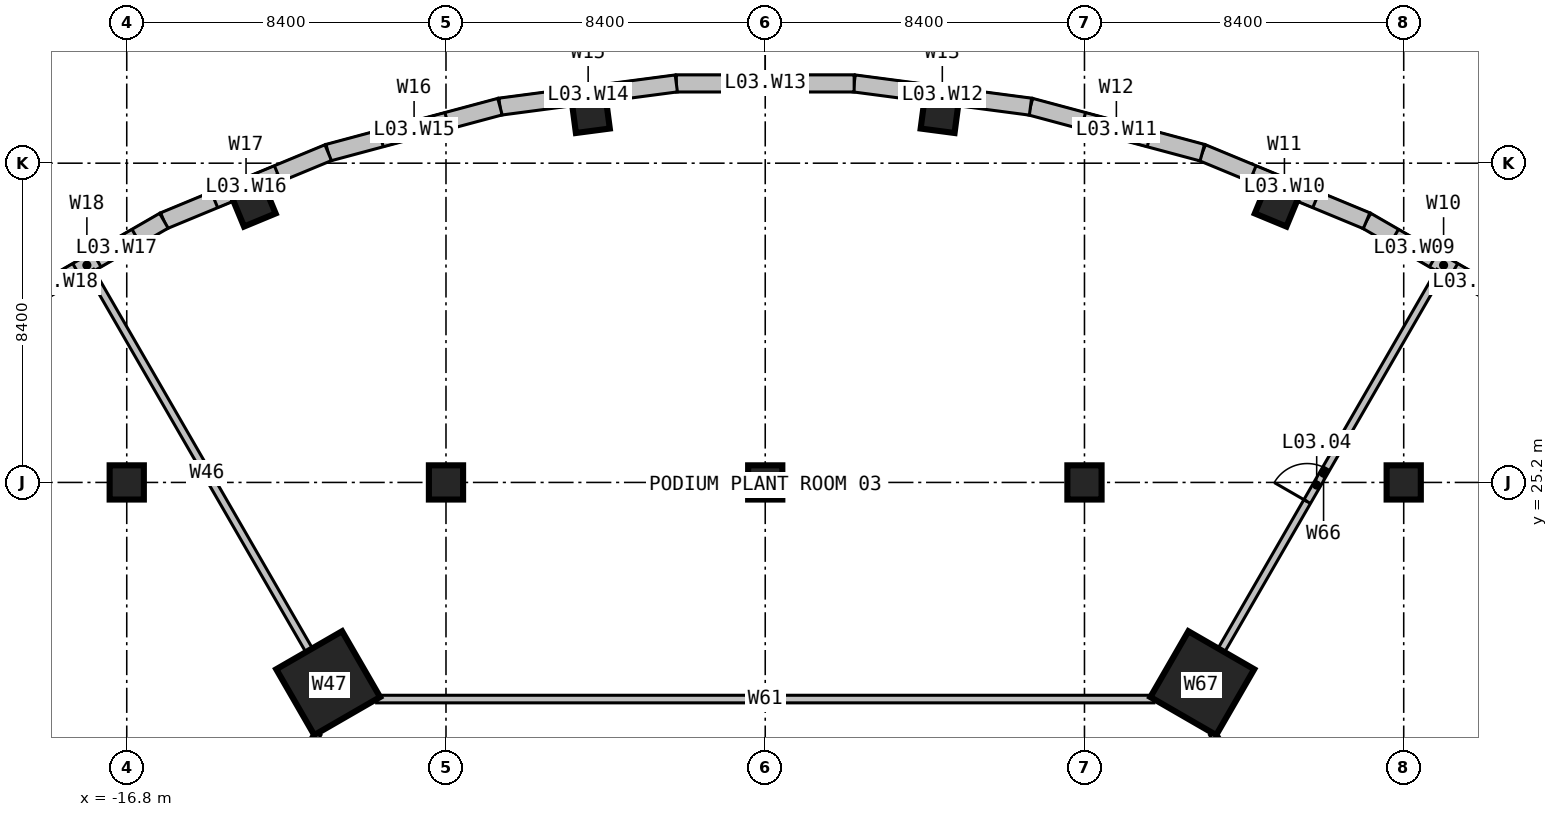
"""IFC4 building model, lengths in metres.
Left out: names, types, materials, properties, quantities, classifications, styles, units other than length and angle.
Written with IfcOpenShell. Run it as: python <this file> out.ifc"""

import sys

from ifc_helpers import new_model, si_unit, direction, frame, frame_2d, origin, origin_2d, place, context, subcontext, project, spatial, rectangle, hollow_rectangle, extrude, element, fill, save


model = new_model("IFC4")
c1 = context("Model", 3, precision=1e-05, world=origin(), true_north=direction((0.0, 1.0)))
c2 = subcontext(c1, "Body", "Model", "MODEL_VIEW")
j1 = project(units=[si_unit("LENGTHUNIT", "METRE"), si_unit("PLANEANGLEUNIT", "RADIAN")], contexts=[c1])
p1 = place(None, origin())
s1 = spatial("IfcSite", under=j1, at=p1, CompositionType="ELEMENT")
p2 = place(p1, origin())
s2 = spatial("IfcBuilding", under=s1, at=p2, CompositionType="ELEMENT")
p3 = place(p2, frame((0.0, 0.0, 16.0)))
s3 = spatial("IfcBuildingStorey", under=s2, at=p3, CompositionType="ELEMENT", Elevation=16.0)
for number, where, z_axis, x_axis in (
    (1, (-16.8, 25.2, 0.0), (0.0, 0.0, 1.0), (1.0, 0.0, 0.0)),
    (2, (-8.4, 25.2, 0.0), (0.0, 0.0, 1.0), (1.0, 0.0, 0.0)),
    (3, (0.0, 25.2, 0.0), (0.0, 0.0, 1.0), (1.0, 0.0, 0.0)),
    (4, (8.4, 25.2, 0.0), (0.0, 0.0, 1.0), (1.0, 0.0, 0.0)),
    (5, (16.8, 25.2, 0.0), (0.0, 0.0, 1.0), (1.0, 0.0, 0.0)),
    (6, (13.47, 32.521, 0.0), (0.0, 0.0, 1.0), (0.383, 0.924, 0.0)),
    (7, (4.594, 34.899, 0.0), (0.0, 0.0, 1.0), (0.131, 0.991, 0.0)),
    (8, (-4.594, 34.899, 0.0), (0.0, 0.0, 1.0), (-0.131, 0.991, 0.0)),
    (9, (-13.47, 32.521, 0.0), (0.0, 0.0, 1.0), (-0.383, 0.924, 0.0)),
):
    element("IfcColumn", number, at=place(p3, frame(where, z_axis=z_axis, x_axis=x_axis)), inside=s3, PredefinedType="COLUMN", context=c2, shape_type="SweptSolid", body=[
        extrude(rectangle(XDim=0.9, YDim=0.9, at=origin_2d()), origin(), (0.0, 0.0, 1.0), 5.0),
    ])
for number, where, z_axis, x_axis in (
    (10, (11.5, 19.919, 0.0), (0.0, 0.0, 1.0), (0.5, 0.866, 0.0)),
    (11, (-11.5, 19.919, 0.0), (0.0, 0.0, 1.0), (-0.5, 0.866, 0.0)),
):
    element("IfcColumn", number, at=place(p3, frame(where, z_axis=z_axis, x_axis=x_axis)), inside=s3, PredefinedType="COLUMN", context=c2, shape_type="SweptSolid", body=[
        extrude(hollow_rectangle(XDim=2.0, YDim=2.0, WallThickness=0.24, at=origin_2d()), origin(), (0.0, 0.0, 1.0), 4.29),
    ])
p4 = place(p3, frame((19.875, 29.746, 0.0), z_axis=(0.0, 0.0, 1.0), x_axis=(-0.866012687223, 0.500022025083, 0.0)))
e12 = element("IfcWall", 12, at=p4, inside=s3, PredefinedType="SOLIDWALL", context=c2, shape_type="SweptSolid", body=[
    extrude(rectangle(XDim=4.679, YDim=0.45, at=frame_2d((2.34, 0.0))), origin(), (0.0, 0.0, 1.0), 4.7),
])
p5 = place(p4, frame((0.84, 0.0, 0.9)))
e13 = element("IfcOpeningElement", 13, at=p5, cuts=e12, PredefinedType="OPENING", context=c2, shape_type="SweptSolid", body=[
    extrude(rectangle(XDim=1.2, YDim=2.4, at=frame_2d((0.6, 1.2))), frame((0.0, 0.235, 0.0), z_axis=(0.0, -1.0, 0.0), x_axis=(1.0, 0.0, 0.0)), (0.0, 0.0, 1.0), 0.47),
])
p6 = place(p4, frame((2.64, 0.0, 0.9)))
e14 = element("IfcOpeningElement", 14, at=p6, cuts=e12, PredefinedType="OPENING", context=c2, shape_type="SweptSolid", body=[
    extrude(rectangle(XDim=1.2, YDim=2.4, at=frame_2d((0.6, 1.2))), frame((0.0, 0.235, 0.0), z_axis=(0.0, -1.0, 0.0), x_axis=(1.0, 0.0, 0.0)), (0.0, 0.0, 1.0), 0.47),
])
p7 = place(p3, frame((15.823, 32.086, 0.0), z_axis=(0.0, 0.0, 1.0), x_axis=(-0.923885213032, 0.382669718086, 0.0)))
e15 = element("IfcWall", 15, at=p7, inside=s3, PredefinedType="SOLIDWALL", context=c2, shape_type="SweptSolid", body=[
    extrude(rectangle(XDim=4.68, YDim=0.45, at=frame_2d((2.34, 0.0))), origin(), (0.0, 0.0, 1.0), 4.7),
])
p8 = place(p7, frame((1.44, 0.0, 0.9)))
e16 = element("IfcOpeningElement", 16, at=p8, cuts=e15, PredefinedType="OPENING", context=c2, shape_type="SweptSolid", body=[
    extrude(rectangle(XDim=1.8, YDim=2.4, at=frame_2d((0.9, 1.2))), frame((0.0, 0.235, 0.0), z_axis=(0.0, -1.0, 0.0), x_axis=(1.0, 0.0, 0.0)), (0.0, 0.0, 1.0), 0.47),
])
p9 = place(p3, frame((11.5, 33.876, 0.0), z_axis=(0.0, 0.0, 1.0), x_axis=(-0.965926860523, 0.258815185258, 0.0)))
e17 = element("IfcWall", 17, at=p9, inside=s3, PredefinedType="SOLIDWALL", context=c2, shape_type="SweptSolid", body=[
    extrude(rectangle(XDim=4.68, YDim=0.45, at=frame_2d((2.34, 0.0))), origin(), (0.0, 0.0, 1.0), 4.7),
])
p10 = place(p9, frame((1.44, 0.0, 0.9)))
e18 = element("IfcOpeningElement", 18, at=p10, cuts=e17, PredefinedType="OPENING", context=c2, shape_type="SweptSolid", body=[
    extrude(rectangle(XDim=1.8, YDim=2.4, at=frame_2d((0.9, 1.2))), frame((0.0, 0.235, 0.0), z_axis=(0.0, -1.0, 0.0), x_axis=(1.0, 0.0, 0.0)), (0.0, 0.0, 1.0), 0.47),
])
p11 = place(p3, frame((6.979, 35.088, 0.0), z_axis=(0.0, 0.0, 1.0), x_axis=(-0.991443459746, 0.130536838198, 0.0)))
e19 = element("IfcWall", 19, at=p11, inside=s3, PredefinedType="SOLIDWALL", context=c2, shape_type="SweptSolid", body=[
    extrude(rectangle(XDim=4.679, YDim=0.45, at=frame_2d((2.34, 0.0))), origin(), (0.0, 0.0, 1.0), 4.7),
])
p12 = place(p11, frame((1.44, 0.0, 0.9)))
e20 = element("IfcOpeningElement", 20, at=p12, cuts=e19, PredefinedType="OPENING", context=c2, shape_type="SweptSolid", body=[
    extrude(rectangle(XDim=1.8, YDim=2.4, at=frame_2d((0.9, 1.2))), frame((0.0, 0.235, 0.0), z_axis=(0.0, -1.0, 0.0), x_axis=(1.0, 0.0, 0.0)), (0.0, 0.0, 1.0), 0.47),
])
p13 = place(p3, frame((2.34, 35.698, 0.0), z_axis=(0.0, 0.0, 1.0), x_axis=(-1.0, 0.0, 0.0)))
e21 = element("IfcWall", 21, at=p13, inside=s3, PredefinedType="SOLIDWALL", context=c2, shape_type="SweptSolid", body=[
    extrude(rectangle(XDim=4.68, YDim=0.45, at=frame_2d((2.34, 0.0))), origin(), (0.0, 0.0, 1.0), 4.7),
])
p14 = place(p13, frame((1.44, 0.0, 0.9)))
e22 = element("IfcOpeningElement", 22, at=p14, cuts=e21, PredefinedType="OPENING", context=c2, shape_type="SweptSolid", body=[
    extrude(rectangle(XDim=1.8, YDim=2.4, at=frame_2d((0.9, 1.2))), frame((0.0, 0.235, 0.0), z_axis=(0.0, -1.0, 0.0), x_axis=(1.0, 0.0, 0.0)), (0.0, 0.0, 1.0), 0.47),
])
p15 = place(p3, frame((-2.34, 35.698, 0.0), z_axis=(0.0, 0.0, 1.0), x_axis=(-0.991443459746, -0.130536838198, 0.0)))
e23 = element("IfcWall", 23, at=p15, inside=s3, PredefinedType="SOLIDWALL", context=c2, shape_type="SweptSolid", body=[
    extrude(rectangle(XDim=4.679, YDim=0.45, at=frame_2d((2.34, 0.0))), origin(), (0.0, 0.0, 1.0), 4.7),
])
p16 = place(p15, frame((1.44, 0.0, 0.9)))
e24 = element("IfcOpeningElement", 24, at=p16, cuts=e23, PredefinedType="OPENING", context=c2, shape_type="SweptSolid", body=[
    extrude(rectangle(XDim=1.8, YDim=2.4, at=frame_2d((0.9, 1.2))), frame((0.0, 0.235, 0.0), z_axis=(0.0, -1.0, 0.0), x_axis=(1.0, 0.0, 0.0)), (0.0, 0.0, 1.0), 0.47),
])
p17 = place(p3, frame((-6.979, 35.088, 0.0), z_axis=(0.0, 0.0, 1.0), x_axis=(-0.965926860523, -0.258815185258, 0.0)))
e25 = element("IfcWall", 25, at=p17, inside=s3, PredefinedType="SOLIDWALL", context=c2, shape_type="SweptSolid", body=[
    extrude(rectangle(XDim=4.68, YDim=0.45, at=frame_2d((2.34, 0.0))), origin(), (0.0, 0.0, 1.0), 4.7),
])
p18 = place(p17, frame((1.44, 0.0, 0.9)))
e26 = element("IfcOpeningElement", 26, at=p18, cuts=e25, PredefinedType="OPENING", context=c2, shape_type="SweptSolid", body=[
    extrude(rectangle(XDim=1.8, YDim=2.4, at=frame_2d((0.9, 1.2))), frame((0.0, 0.235, 0.0), z_axis=(0.0, -1.0, 0.0), x_axis=(1.0, 0.0, 0.0)), (0.0, 0.0, 1.0), 0.47),
])
p19 = place(p3, frame((-11.5, 33.876, 0.0), z_axis=(0.0, 0.0, 1.0), x_axis=(-0.923885213032, -0.382669718086, 0.0)))
e27 = element("IfcWall", 27, at=p19, inside=s3, PredefinedType="SOLIDWALL", context=c2, shape_type="SweptSolid", body=[
    extrude(rectangle(XDim=4.68, YDim=0.45, at=frame_2d((2.34, 0.0))), origin(), (0.0, 0.0, 1.0), 4.7),
])
p20 = place(p19, frame((1.44, 0.0, 0.9)))
e28 = element("IfcOpeningElement", 28, at=p20, cuts=e27, PredefinedType="OPENING", context=c2, shape_type="SweptSolid", body=[
    extrude(rectangle(XDim=1.8, YDim=2.4, at=frame_2d((0.9, 1.2))), frame((0.0, 0.235, 0.0), z_axis=(0.0, -1.0, 0.0), x_axis=(1.0, 0.0, 0.0)), (0.0, 0.0, 1.0), 0.47),
])
p21 = place(p3, frame((-15.823, 32.086, 0.0), z_axis=(0.0, 0.0, 1.0), x_axis=(-0.866012687223, -0.500022025083, 0.0)))
e29 = element("IfcWall", 29, at=p21, inside=s3, PredefinedType="SOLIDWALL", context=c2, shape_type="SweptSolid", body=[
    extrude(rectangle(XDim=4.679, YDim=0.45, at=frame_2d((2.34, 0.0))), origin(), (0.0, 0.0, 1.0), 4.7),
])
p22 = place(p21, frame((0.84, 0.0, 0.9)))
e30 = element("IfcOpeningElement", 30, at=p22, cuts=e29, PredefinedType="OPENING", context=c2, shape_type="SweptSolid", body=[
    extrude(rectangle(XDim=1.2, YDim=2.4, at=frame_2d((0.6, 1.2))), frame((0.0, 0.235, 0.0), z_axis=(0.0, -1.0, 0.0), x_axis=(1.0, 0.0, 0.0)), (0.0, 0.0, 1.0), 0.47),
])
p23 = place(p21, frame((2.64, 0.0, 0.9)))
e31 = element("IfcOpeningElement", 31, at=p23, cuts=e29, PredefinedType="OPENING", context=c2, shape_type="SweptSolid", body=[
    extrude(rectangle(XDim=1.2, YDim=2.4, at=frame_2d((0.6, 1.2))), frame((0.0, 0.235, 0.0), z_axis=(0.0, -1.0, 0.0), x_axis=(1.0, 0.0, 0.0)), (0.0, 0.0, 1.0), 0.47),
])
p24 = place(p3, frame((-17.76, 30.76, 0.0), z_axis=(0.0, 0.0, 1.0), x_axis=(0.499954853145, -0.866051467764, 0.0)))
e32 = element("IfcWall", 32, at=p24, inside=s3, PredefinedType="PARTITIONING", context=c2, shape_type="SweptSolid", body=[
    extrude(rectangle(XDim=12.277, YDim=0.2, at=frame_2d((6.138, 0.0))), origin(), (0.0, 0.0, 1.0), 4.7),
])
p25 = place(p3, frame((-11.62, 20.124, 0.0), z_axis=(0.0, 0.0, 1.0), x_axis=(0.500070134591, -0.865984907773, 0.0)))
e33 = element("IfcWall", 33, at=p25, inside=s3, PredefinedType="PARTITIONING", context=c2, shape_type="SweptSolid", body=[
    extrude(rectangle(XDim=0.608, YDim=0.2, at=frame_2d((0.304, 0.0))), origin(), (0.0, 0.0, 1.0), 1.89),
])
p26 = place(p3, frame((-14.28, 14.28, 0.0), z_axis=(0.0, 0.0, 1.0), x_axis=(0.500785735381, 0.865571283742, 0.0)))
e34 = element("IfcWall", 34, at=p26, inside=s3, PredefinedType="PARTITIONING", context=c2, shape_type="SweptSolid", body=[
    extrude(rectangle(XDim=4.994, YDim=0.2, at=frame_2d((2.497, 0.0))), origin(), (0.0, 0.0, 1.0), 1.89),
])
p27 = place(p3, frame((-10.225, 19.5, 0.0), z_axis=(0.0, 0.0, 1.0), x_axis=(1.0, 0.0, 0.0)))
e35 = element("IfcWall", 35, at=p27, inside=s3, PredefinedType="PARTITIONING", context=c2, shape_type="SweptSolid", body=[
    extrude(rectangle(XDim=20.45, YDim=0.2, at=frame_2d((10.225, 0.0))), origin(), (0.0, 0.0, 1.0), 1.89),
])
p28 = place(p3, frame((11.779, 18.603, 0.0), z_axis=(0.0, 0.0, 1.0), x_axis=(0.500785735381, -0.865571283742, 0.0)))
e36 = element("IfcWall", 36, at=p28, inside=s3, PredefinedType="PARTITIONING", context=c2, shape_type="SweptSolid", body=[
    extrude(rectangle(XDim=4.994, YDim=0.2, at=frame_2d((2.497, 0.0))), origin(), (0.0, 0.0, 1.0), 1.89),
])
p29 = place(p3, frame((11.622, 20.128, 0.0), z_axis=(0.0, 0.0, 1.0), x_axis=(0.499954853145, 0.866051467764, 0.0)))
e37 = element("IfcWall", 37, at=p29, inside=s3, PredefinedType="PARTITIONING", context=c2, shape_type="SweptSolid", body=[
    extrude(rectangle(XDim=12.277, YDim=0.2, at=frame_2d((6.138, 0.0))), origin(), (0.0, 0.0, 1.0), 4.7),
])
p30 = place(p29, frame((5.276, 0.0, 0.0)))
e38 = element("IfcOpeningElement", 38, at=p30, cuts=e37, PredefinedType="OPENING", context=c2, shape_type="SweptSolid", body=[
    extrude(rectangle(XDim=1.0, YDim=2.2, at=frame_2d((0.5, 1.1))), frame((0.0, 0.11, 0.0), z_axis=(0.0, -1.0, 0.0), x_axis=(1.0, 0.0, 0.0)), (0.0, 0.0, 1.0), 0.22),
])
p31 = place(p3, frame((11.316, 19.597, 0.0), z_axis=(0.0, 0.0, 1.0), x_axis=(0.500070134591, 0.865984907773, 0.0)))
e39 = element("IfcWall", 39, at=p31, inside=s3, PredefinedType="PARTITIONING", context=c2, shape_type="SweptSolid", body=[
    extrude(rectangle(XDim=0.608, YDim=0.2, at=frame_2d((0.304, 0.0))), origin(), (0.0, 0.0, 1.0), 1.89),
])
p32 = place(p5, origin())
e40 = element("IfcWindow", 40, at=p32, inside=s3, PartitioningType="SINGLE_PANEL", PredefinedType="WINDOW", context=c2, shape_type="SweptSolid", body=[
    extrude(rectangle(XDim=1.2, YDim=2.4, at=frame_2d((0.6, 1.2))), frame((0.0, 0.03, 0.0), z_axis=(0.0, -1.0, 0.0), x_axis=(1.0, 0.0, 0.0)), (0.0, 0.0, 1.0), 0.06),
])
fill(e13, e40)
p33 = place(p6, origin())
e41 = element("IfcWindow", 41, at=p33, inside=s3, PartitioningType="SINGLE_PANEL", PredefinedType="WINDOW", context=c2, shape_type="SweptSolid", body=[
    extrude(rectangle(XDim=1.2, YDim=2.4, at=frame_2d((0.6, 1.2))), frame((0.0, 0.03, 0.0), z_axis=(0.0, -1.0, 0.0), x_axis=(1.0, 0.0, 0.0)), (0.0, 0.0, 1.0), 0.06),
])
fill(e14, e41)
p34 = place(p8, origin())
e42 = element("IfcWindow", 42, at=p34, inside=s3, PartitioningType="SINGLE_PANEL", PredefinedType="WINDOW", context=c2, shape_type="SweptSolid", body=[
    extrude(rectangle(XDim=1.8, YDim=2.4, at=frame_2d((0.9, 1.2))), frame((0.0, 0.03, 0.0), z_axis=(0.0, -1.0, 0.0), x_axis=(1.0, 0.0, 0.0)), (0.0, 0.0, 1.0), 0.06),
])
fill(e16, e42)
p35 = place(p10, origin())
e43 = element("IfcWindow", 43, at=p35, inside=s3, PartitioningType="SINGLE_PANEL", PredefinedType="WINDOW", context=c2, shape_type="SweptSolid", body=[
    extrude(rectangle(XDim=1.8, YDim=2.4, at=frame_2d((0.9, 1.2))), frame((0.0, 0.03, 0.0), z_axis=(0.0, -1.0, 0.0), x_axis=(1.0, 0.0, 0.0)), (0.0, 0.0, 1.0), 0.06),
])
fill(e18, e43)
p36 = place(p12, origin())
e44 = element("IfcWindow", 44, at=p36, inside=s3, PartitioningType="SINGLE_PANEL", PredefinedType="WINDOW", context=c2, shape_type="SweptSolid", body=[
    extrude(rectangle(XDim=1.8, YDim=2.4, at=frame_2d((0.9, 1.2))), frame((0.0, 0.03, 0.0), z_axis=(0.0, -1.0, 0.0), x_axis=(1.0, 0.0, 0.0)), (0.0, 0.0, 1.0), 0.06),
])
fill(e20, e44)
p37 = place(p14, origin())
e45 = element("IfcWindow", 45, at=p37, inside=s3, PartitioningType="SINGLE_PANEL", PredefinedType="WINDOW", context=c2, shape_type="SweptSolid", body=[
    extrude(rectangle(XDim=1.8, YDim=2.4, at=frame_2d((0.9, 1.2))), frame((0.0, 0.03, 0.0), z_axis=(0.0, -1.0, 0.0), x_axis=(1.0, 0.0, 0.0)), (0.0, 0.0, 1.0), 0.06),
])
fill(e22, e45)
p38 = place(p16, origin())
e46 = element("IfcWindow", 46, at=p38, inside=s3, PartitioningType="SINGLE_PANEL", PredefinedType="WINDOW", context=c2, shape_type="SweptSolid", body=[
    extrude(rectangle(XDim=1.8, YDim=2.4, at=frame_2d((0.9, 1.2))), frame((0.0, 0.03, 0.0), z_axis=(0.0, -1.0, 0.0), x_axis=(1.0, 0.0, 0.0)), (0.0, 0.0, 1.0), 0.06),
])
fill(e24, e46)
p39 = place(p18, origin())
e47 = element("IfcWindow", 47, at=p39, inside=s3, PartitioningType="SINGLE_PANEL", PredefinedType="WINDOW", context=c2, shape_type="SweptSolid", body=[
    extrude(rectangle(XDim=1.8, YDim=2.4, at=frame_2d((0.9, 1.2))), frame((0.0, 0.03, 0.0), z_axis=(0.0, -1.0, 0.0), x_axis=(1.0, 0.0, 0.0)), (0.0, 0.0, 1.0), 0.06),
])
fill(e26, e47)
p40 = place(p20, origin())
e48 = element("IfcWindow", 48, at=p40, inside=s3, PartitioningType="SINGLE_PANEL", PredefinedType="WINDOW", context=c2, shape_type="SweptSolid", body=[
    extrude(rectangle(XDim=1.8, YDim=2.4, at=frame_2d((0.9, 1.2))), frame((0.0, 0.03, 0.0), z_axis=(0.0, -1.0, 0.0), x_axis=(1.0, 0.0, 0.0)), (0.0, 0.0, 1.0), 0.06),
])
fill(e28, e48)
p41 = place(p22, origin())
e49 = element("IfcWindow", 49, at=p41, inside=s3, PartitioningType="SINGLE_PANEL", PredefinedType="WINDOW", context=c2, shape_type="SweptSolid", body=[
    extrude(rectangle(XDim=1.2, YDim=2.4, at=frame_2d((0.6, 1.2))), frame((0.0, 0.03, 0.0), z_axis=(0.0, -1.0, 0.0), x_axis=(1.0, 0.0, 0.0)), (0.0, 0.0, 1.0), 0.06),
])
fill(e30, e49)
p42 = place(p23, origin())
e50 = element("IfcWindow", 50, at=p42, inside=s3, PartitioningType="SINGLE_PANEL", PredefinedType="WINDOW", context=c2, shape_type="SweptSolid", body=[
    extrude(rectangle(XDim=1.2, YDim=2.4, at=frame_2d((0.6, 1.2))), frame((0.0, 0.03, 0.0), z_axis=(0.0, -1.0, 0.0), x_axis=(1.0, 0.0, 0.0)), (0.0, 0.0, 1.0), 0.06),
])
fill(e31, e50)
p43 = place(p30, origin())
e51 = element("IfcDoor", 51, at=p43, inside=s3, OperationType="SINGLE_SWING_LEFT", PredefinedType="DOOR", context=c2, shape_type="SweptSolid", body=[
    extrude(rectangle(XDim=1.0, YDim=2.2, at=frame_2d((0.5, 1.1))), frame((0.0, 0.025, 0.0), z_axis=(0.0, -1.0, 0.0), x_axis=(1.0, 0.0, 0.0)), (0.0, 0.0, 1.0), 0.05),
])
fill(e38, e51)
save(model, sys.argv[1])
